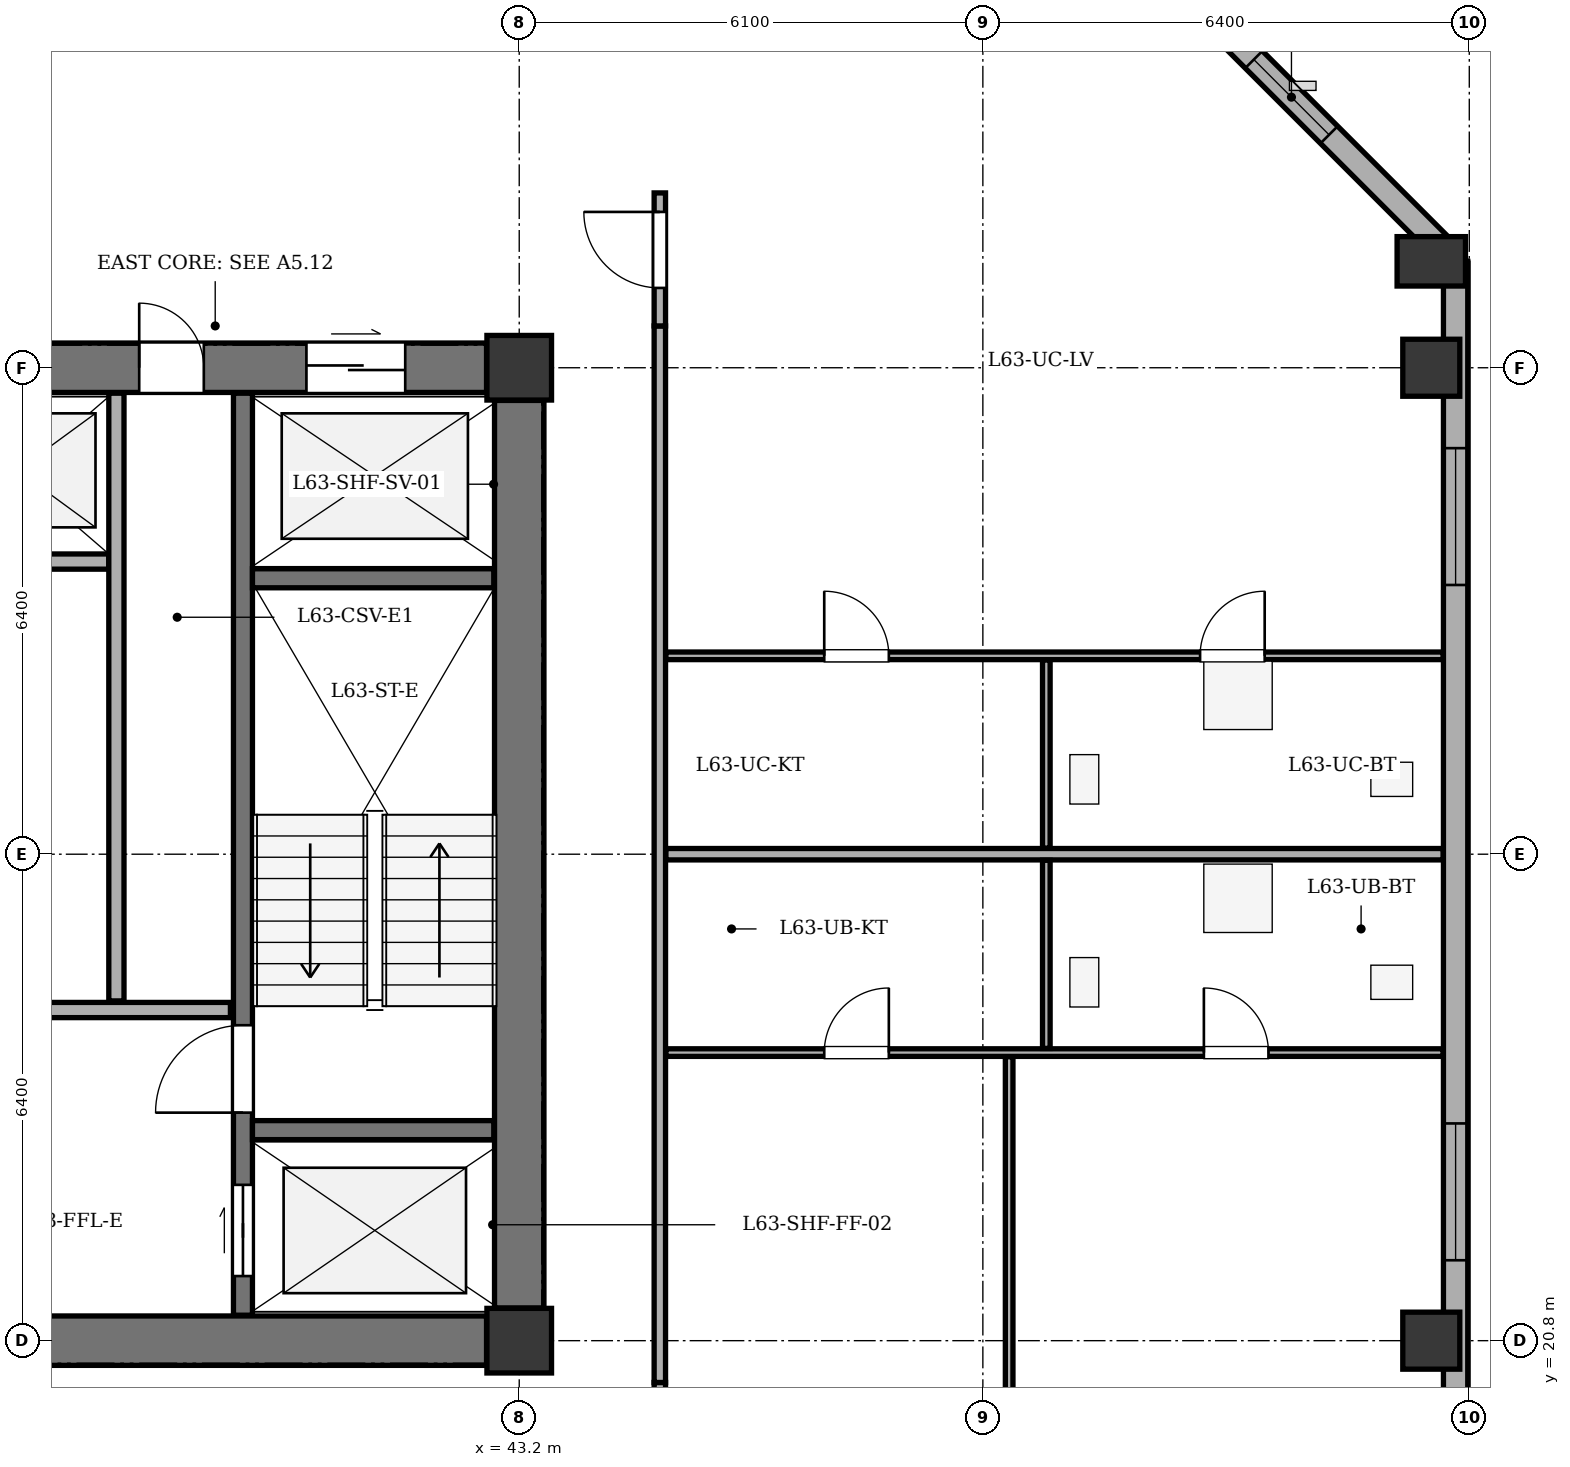
"""IFC4 building model, lengths in metres.
Left out: names, types, materials, properties, quantities, classifications, styles, units other than length and angle.
Written with IfcOpenShell. Run it as: python <this file> out.ifc"""

import sys

from ifc_helpers import new_model, si_unit, direction, frame, frame_2d, origin, origin_2d, place, context, subcontext, project, spatial, rectangle, extrude, element, fill, save


model = new_model("IFC4")
c1 = context("Model", 3, precision=1e-05, world=origin(), true_north=direction((0.0, 1.0)))
c2 = subcontext(c1, "Body", "Model", "MODEL_VIEW")
j1 = project(units=[si_unit("LENGTHUNIT", "METRE"), si_unit("PLANEANGLEUNIT", "RADIAN")], contexts=[c1])
p1 = place(None, origin())
s1 = spatial("IfcSite", under=j1, at=p1, CompositionType="ELEMENT")
p2 = place(p1, origin())
s2 = spatial("IfcBuilding", under=s1, at=p2, CompositionType="ELEMENT")
p3 = place(p2, frame((0.0, 0.0, 241.5)))
s3 = spatial("IfcBuildingStorey", under=s2, at=p3, CompositionType="ELEMENT", Elevation=241.5)
for number, where, z_axis, x_axis in (
    (1, (43.2, 20.8, 0.0), (0.0, 0.0, 1.0), (1.0, 0.0, 0.0)),
    (2, (43.2, 33.6, 0.0), (0.0, 0.0, 1.0), (1.0, 0.0, 0.0)),
):
    element("IfcColumn", number, at=place(p3, frame(where, z_axis=z_axis, x_axis=x_axis)), inside=s3, PredefinedType="COLUMN", context=c2, shape_type="SweptSolid", body=[
        extrude(rectangle(XDim=0.85, YDim=0.85, at=origin_2d()), origin(), (0.0, 0.0, 1.0), 3.4),
    ])
for number, where, z_axis, x_axis in (
    (3, (55.2, 20.8, 0.0), (0.0, 0.0, 1.0), (1.0, 0.0, 0.0)),
    (4, (55.2, 33.6, 0.0), (0.0, 0.0, 1.0), (1.0, 0.0, 0.0)),
):
    element("IfcColumn", number, at=place(p3, frame(where, z_axis=z_axis, x_axis=x_axis)), inside=s3, PredefinedType="COLUMN", context=c2, shape_type="SweptSolid", body=[
        extrude(rectangle(XDim=0.75, YDim=0.75, at=origin_2d()), origin(), (0.0, 0.0, 1.0), 3.4),
    ])
p4 = place(p3, frame((55.2, 35.0, 0.0), z_axis=(0.0, 0.0, 1.0), x_axis=(1.0, 0.0, 0.0)))
e5 = element("IfcColumn", 5, at=p4, inside=s3, PredefinedType="COLUMN", context=c2, shape_type="SweptSolid", body=[
    extrude(rectangle(XDim=0.65, YDim=0.9, at=origin_2d()), origin(), (0.0, 0.0, 1.0), 3.4),
])
p5 = place(p3, frame((51.2, 39.32, 0.0), z_axis=(0.0, 0.0, 1.0), x_axis=(0.707106781187, -0.707106781187, 0.0)))
e6 = element("IfcWall", 6, at=p5, inside=s3, PredefinedType="STANDARD", context=c2, shape_type="SweptSolid", body=[
    extrude(rectangle(XDim=6.11, YDim=0.32, at=frame_2d((3.055, 0.0))), origin(), (0.0, 0.0, 1.0), 2.725),
])
p6 = place(p5, frame((2.355, 0.0, 0.75)))
e7 = element("IfcOpeningElement", 7, at=p6, cuts=e6, PredefinedType="OPENING", context=c2, shape_type="SweptSolid", body=[
    extrude(rectangle(XDim=1.4, YDim=1.65, at=frame_2d((0.7, 0.825))), frame((0.0, 0.17, 0.0), z_axis=(0.0, -1.0, 0.0), x_axis=(1.0, 0.0, 0.0)), (0.0, 0.0, 1.0), 0.34),
])
p7 = place(p3, frame((55.52, 35.0, 0.0), z_axis=(0.0, 0.0, 1.0), x_axis=(0.0, -1.0, 0.0)))
e8 = element("IfcWall", 8, at=p7, inside=s3, PredefinedType="STANDARD", context=c2, shape_type="SweptSolid", body=[
    extrude(rectangle(XDim=27.8, YDim=0.32, at=frame_2d((13.9, 0.0))), origin(), (0.0, 0.0, 1.0), 2.725),
])
p8 = place(p7, frame((2.458, 0.0, 0.75)))
e9 = element("IfcOpeningElement", 9, at=p8, cuts=e8, PredefinedType="OPENING", context=c2, shape_type="SweptSolid", body=[
    extrude(rectangle(XDim=1.8, YDim=1.7, at=frame_2d((0.9, 0.85))), frame((0.0, 0.17, 0.0), z_axis=(0.0, -1.0, 0.0), x_axis=(1.0, 0.0, 0.0)), (0.0, 0.0, 1.0), 0.34),
])
p9 = place(p7, frame((11.342, 0.0, 0.75)))
e10 = element("IfcOpeningElement", 10, at=p9, cuts=e8, PredefinedType="OPENING", context=c2, shape_type="SweptSolid", body=[
    extrude(rectangle(XDim=1.8, YDim=1.7, at=frame_2d((0.9, 0.85))), frame((0.0, 0.17, 0.0), z_axis=(0.0, -1.0, 0.0), x_axis=(1.0, 0.0, 0.0)), (0.0, 0.0, 1.0), 0.34),
])
p10 = place(p7, frame((17.117, 0.0, 0.75)))
e11 = element("IfcOpeningElement", 11, at=p10, cuts=e8, PredefinedType="OPENING", context=c2, shape_type="SweptSolid", body=[
    extrude(rectangle(XDim=1.8, YDim=1.7, at=frame_2d((0.9, 0.85))), frame((0.0, 0.17, 0.0), z_axis=(0.0, -1.0, 0.0), x_axis=(1.0, 0.0, 0.0)), (0.0, 0.0, 1.0), 0.34),
])
p11 = place(p7, frame((22.808, 0.0, 0.75)))
e12 = element("IfcOpeningElement", 12, at=p11, cuts=e8, PredefinedType="OPENING", context=c2, shape_type="SweptSolid", body=[
    extrude(rectangle(XDim=2.2, YDim=1.7, at=frame_2d((1.1, 0.85))), frame((0.0, 0.17, 0.0), z_axis=(0.0, -1.0, 0.0), x_axis=(1.0, 0.0, 0.0)), (0.0, 0.0, 1.0), 0.34),
])
p12 = place(p3, frame((43.2, 21.23, 0.0), z_axis=(0.0, 0.0, 1.0), x_axis=(0.0, 1.0, 0.0)))
e13 = element("IfcWall", 13, at=p12, inside=s3, PredefinedType="SHEAR", context=c2, shape_type="SweptSolid", body=[
    extrude(rectangle(XDim=11.94, YDim=0.65, at=frame_2d((5.97, 0.0))), origin(), (0.0, 0.0, 1.0), 3.1),
])
p13 = place(p3, frame((35.63, 20.8, 0.0), z_axis=(0.0, 0.0, 1.0), x_axis=(1.0, 0.0, 0.0)))
e14 = element("IfcWall", 14, at=p13, inside=s3, PredefinedType="SHEAR", context=c2, shape_type="SweptSolid", body=[
    extrude(rectangle(XDim=7.14, YDim=0.65, at=frame_2d((3.57, 0.0))), origin(), (0.0, 0.0, 1.0), 3.1),
])
p14 = place(p3, frame((35.63, 33.6, 0.0), z_axis=(0.0, 0.0, 1.0), x_axis=(1.0, 0.0, 0.0)))
e15 = element("IfcWall", 15, at=p14, inside=s3, PredefinedType="SHEAR", context=c2, shape_type="SweptSolid", body=[
    extrude(rectangle(XDim=7.14, YDim=0.65, at=frame_2d((3.57, 0.0))), origin(), (0.0, 0.0, 1.0), 3.1),
])
p15 = place(p14, frame((4.77, 0.0, 0.0)))
e16 = element("IfcOpeningElement", 16, at=p15, cuts=e15, PredefinedType="OPENING", context=c2, shape_type="SweptSolid", body=[
    extrude(rectangle(XDim=1.3, YDim=2.15, at=frame_2d((0.65, 1.075))), frame((0.0, 0.335, 0.0), z_axis=(0.0, -1.0, 0.0), x_axis=(1.0, 0.0, 0.0)), (0.0, 0.0, 1.0), 0.67),
])
p16 = place(p14, frame((2.57, 0.0, 0.0)))
e17 = element("IfcOpeningElement", 17, at=p16, cuts=e15, PredefinedType="OPENING", context=c2, shape_type="SweptSolid", body=[
    extrude(rectangle(XDim=0.85, YDim=2.02, at=frame_2d((0.425, 1.01))), frame((0.0, 0.335, 0.0), z_axis=(0.0, -1.0, 0.0), x_axis=(1.0, 0.0, 0.0)), (0.0, 0.0, 1.0), 0.67),
])
p17 = place(p3, frame((39.565, 21.135, 0.0), z_axis=(0.0, 0.0, 1.0), x_axis=(0.0, 1.0, 0.0)))
e18 = element("IfcWall", 18, at=p17, inside=s3, PredefinedType="SHEAR", context=c2, shape_type="SweptSolid", body=[
    extrude(rectangle(XDim=12.13, YDim=0.25, at=frame_2d((6.065, 0.0))), origin(), (0.0, 0.0, 1.0), 3.1),
])
p18 = place(p17, frame((0.515, 0.0, 0.0)))
e19 = element("IfcOpeningElement", 19, at=p18, cuts=e18, PredefinedType="OPENING", context=c2, shape_type="SweptSolid", body=[
    extrude(rectangle(XDim=1.2, YDim=2.15, at=frame_2d((0.6, 1.075))), frame((0.0, 0.135, 0.0), z_axis=(0.0, -1.0, 0.0), x_axis=(1.0, 0.0, 0.0)), (0.0, 0.0, 1.0), 0.27),
])
p19 = place(p17, frame((2.665, 0.0, 0.0)))
e20 = element("IfcOpeningElement", 20, at=p19, cuts=e18, PredefinedType="OPENING", context=c2, shape_type="SweptSolid", body=[
    extrude(rectangle(XDim=1.15, YDim=2.15, at=frame_2d((0.575, 1.075))), frame((0.0, 0.135, 0.0), z_axis=(0.0, -1.0, 0.0), x_axis=(1.0, 0.0, 0.0)), (0.0, 0.0, 1.0), 0.27),
])
for number, where, z_axis, x_axis in (
    (21, (39.69, 23.57, 0.0), (0.0, 0.0, 1.0), (1.0, 0.0, 0.0)),
    (22, (39.69, 30.83, 0.0), (0.0, 0.0, 1.0), (1.0, 0.0, 0.0)),
):
    element("IfcWall", number, at=place(p3, frame(where, z_axis=z_axis, x_axis=x_axis)), inside=s3, PredefinedType="SHEAR", context=c2, shape_type="SweptSolid", body=[
        extrude(rectangle(XDim=3.175, YDim=0.25, at=frame_2d((1.587, 0.0))), origin(), (0.0, 0.0, 1.0), 3.1),
    ])
p20 = place(p3, frame((35.55, 25.15, 0.0), z_axis=(0.0, 0.0, 1.0), x_axis=(1.0, 0.0, 0.0)))
e23 = element("IfcWall", 23, at=p20, inside=s3, PredefinedType="SOLIDWALL", context=c2, shape_type="SweptSolid", body=[
    extrude(rectangle(XDim=3.85, YDim=0.2, at=frame_2d((1.925, 0.0))), origin(), (0.0, 0.0, 1.0), 3.1),
])
p21 = place(p3, frame((35.55, 31.05, 0.0), z_axis=(0.0, 0.0, 1.0), x_axis=(1.0, 0.0, 0.0)))
e24 = element("IfcWall", 24, at=p21, inside=s3, PredefinedType="SOLIDWALL", context=c2, shape_type="SweptSolid", body=[
    extrude(rectangle(XDim=2.25, YDim=0.2, at=frame_2d((1.125, 0.0))), origin(), (0.0, 0.0, 1.0), 3.1),
])
p22 = place(p3, frame((37.9, 25.27, 0.0), z_axis=(0.0, 0.0, 1.0), x_axis=(0.0, 1.0, 0.0)))
e25 = element("IfcWall", 25, at=p22, inside=s3, PredefinedType="SOLIDWALL", context=c2, shape_type="SweptSolid", body=[
    extrude(rectangle(XDim=7.995, YDim=0.2, at=frame_2d((3.998, 0.0))), origin(), (0.0, 0.0, 1.0), 3.1),
])
p23 = place(p3, frame((45.05, 18.46, 0.0), z_axis=(0.0, 0.0, 1.0), x_axis=(0.0, 1.0, 0.0)))
e26 = element("IfcWall", 26, at=p23, inside=s3, PredefinedType="PARTITIONING", context=c2, shape_type="SweptSolid", body=[
    extrude(rectangle(XDim=1.79, YDim=0.15, at=frame_2d((0.895, 0.0))), origin(), (0.0, 0.0, 1.0), 2.725),
])
p24 = place(p23, frame((0.375, 0.0, 0.0)))
e27 = element("IfcOpeningElement", 27, at=p24, cuts=e26, PredefinedType="OPENING", context=c2, shape_type="SweptSolid", body=[
    extrude(rectangle(XDim=1.0, YDim=2.1, at=frame_2d((0.5, 1.05))), frame((0.0, 0.085, 0.0), z_axis=(0.0, -1.0, 0.0), x_axis=(1.0, 0.0, 0.0)), (0.0, 0.0, 1.0), 0.17),
])
p25 = place(p3, frame((45.05, 20.25, 0.0), z_axis=(0.0, 0.0, 1.0), x_axis=(0.0, 1.0, 0.0)))
e28 = element("IfcWall", 28, at=p25, inside=s3, PredefinedType="PARTITIONING", context=c2, shape_type="SweptSolid", body=[
    extrude(rectangle(XDim=13.9, YDim=0.15, at=frame_2d((6.95, 0.0))), origin(), (0.0, 0.0, 1.0), 2.725),
])
p26 = place(p3, frame((45.05, 34.15, 0.0), z_axis=(0.0, 0.0, 1.0), x_axis=(0.0, 1.0, 0.0)))
e29 = element("IfcWall", 29, at=p26, inside=s3, PredefinedType="PARTITIONING", context=c2, shape_type="SweptSolid", body=[
    extrude(rectangle(XDim=1.75, YDim=0.15, at=frame_2d((0.875, 0.0))), origin(), (0.0, 0.0, 1.0), 2.725),
])
p27 = place(p26, frame((0.5, 0.0, 0.0)))
e30 = element("IfcOpeningElement", 30, at=p27, cuts=e29, PredefinedType="OPENING", context=c2, shape_type="SweptSolid", body=[
    extrude(rectangle(XDim=1.0, YDim=2.1, at=frame_2d((0.5, 1.05))), frame((0.0, 0.085, 0.0), z_axis=(0.0, -1.0, 0.0), x_axis=(1.0, 0.0, 0.0)), (0.0, 0.0, 1.0), 0.17),
])
p28 = place(p3, frame((45.13, 27.2, 0.0), z_axis=(0.0, 0.0, 1.0), x_axis=(1.0, 0.0, 0.0)))
e31 = element("IfcWall", 31, at=p28, inside=s3, PredefinedType="PARTITIONING", context=c2, shape_type="SweptSolid", body=[
    extrude(rectangle(XDim=10.225, YDim=0.15, at=frame_2d((5.113, 0.0))), origin(), (0.0, 0.0, 1.0), 2.725),
])
p29 = place(p3, frame((45.13, 24.59, 0.0), z_axis=(0.0, 0.0, 1.0), x_axis=(1.0, 0.0, 0.0)))
e32 = element("IfcWall", 32, at=p29, inside=s3, PredefinedType="PARTITIONING", context=c2, shape_type="SweptSolid", body=[
    extrude(rectangle(XDim=10.225, YDim=0.1, at=frame_2d((5.113, 0.0))), origin(), (0.0, 0.0, 1.0), 3.1),
])
p30 = place(p29, frame((2.083, 0.0, 0.0)))
e33 = element("IfcOpeningElement", 33, at=p30, cuts=e32, PredefinedType="OPENING", context=c2, shape_type="SweptSolid", body=[
    extrude(rectangle(XDim=0.85, YDim=2.05, at=frame_2d((0.425, 1.025))), frame((0.0, 0.06, 0.0), z_axis=(0.0, -1.0, 0.0), x_axis=(1.0, 0.0, 0.0)), (0.0, 0.0, 1.0), 0.12),
])
p31 = place(p29, frame((7.078, 0.0, 0.0)))
e34 = element("IfcOpeningElement", 34, at=p31, cuts=e32, PredefinedType="OPENING", context=c2, shape_type="SweptSolid", body=[
    extrude(rectangle(XDim=0.85, YDim=2.05, at=frame_2d((0.425, 1.025))), frame((0.0, 0.06, 0.0), z_axis=(0.0, -1.0, 0.0), x_axis=(1.0, 0.0, 0.0)), (0.0, 0.0, 1.0), 0.12),
])
p32 = place(p3, frame((49.646, 7.08, 0.0), z_axis=(0.0, 0.0, 1.0), x_axis=(0.0, 1.0, 0.0)))
e35 = element("IfcWall", 35, at=p32, inside=s3, PredefinedType="PARTITIONING", context=c2, shape_type="SweptSolid", body=[
    extrude(rectangle(XDim=17.455, YDim=0.1, at=frame_2d((8.728, 0.0))), origin(), (0.0, 0.0, 1.0), 3.1),
])
p33 = place(p32, frame((0.7, 0.0, 0.0)))
e36 = element("IfcOpeningElement", 36, at=p33, cuts=e35, PredefinedType="OPENING", context=c2, shape_type="SweptSolid", body=[
    extrude(rectangle(XDim=0.9, YDim=2.05, at=frame_2d((0.45, 1.025))), frame((0.0, 0.06, 0.0), z_axis=(0.0, -1.0, 0.0), x_axis=(1.0, 0.0, 0.0)), (0.0, 0.0, 1.0), 0.12),
])
p34 = place(p3, frame((50.135, 24.645, 0.0), z_axis=(0.0, 0.0, 1.0), x_axis=(0.0, 1.0, 0.0)))
e37 = element("IfcWall", 37, at=p34, inside=s3, PredefinedType="PARTITIONING", context=c2, shape_type="SweptSolid", body=[
    extrude(rectangle(XDim=2.475, YDim=0.1, at=frame_2d((1.238, 0.0))), origin(), (0.0, 0.0, 1.0), 3.1),
])
p35 = place(p3, frame((45.13, 29.81, 0.0), z_axis=(0.0, 0.0, 1.0), x_axis=(1.0, 0.0, 0.0)))
e38 = element("IfcWall", 38, at=p35, inside=s3, PredefinedType="PARTITIONING", context=c2, shape_type="SweptSolid", body=[
    extrude(rectangle(XDim=10.225, YDim=0.1, at=frame_2d((5.113, 0.0))), origin(), (0.0, 0.0, 1.0), 3.1),
])
p36 = place(p35, frame((2.083, 0.0, 0.0)))
e39 = element("IfcOpeningElement", 39, at=p36, cuts=e38, PredefinedType="OPENING", context=c2, shape_type="SweptSolid", body=[
    extrude(rectangle(XDim=0.85, YDim=2.05, at=frame_2d((0.425, 1.025))), frame((0.0, 0.06, 0.0), z_axis=(0.0, -1.0, 0.0), x_axis=(1.0, 0.0, 0.0)), (0.0, 0.0, 1.0), 0.12),
])
p37 = place(p35, frame((7.028, 0.0, 0.0)))
e40 = element("IfcOpeningElement", 40, at=p37, cuts=e38, PredefinedType="OPENING", context=c2, shape_type="SweptSolid", body=[
    extrude(rectangle(XDim=0.85, YDim=2.05, at=frame_2d((0.425, 1.025))), frame((0.0, 0.06, 0.0), z_axis=(0.0, -1.0, 0.0), x_axis=(1.0, 0.0, 0.0)), (0.0, 0.0, 1.0), 0.12),
])
p38 = place(p3, frame((50.135, 27.28, 0.0), z_axis=(0.0, 0.0, 1.0), x_axis=(0.0, 1.0, 0.0)))
e41 = element("IfcWall", 41, at=p38, inside=s3, PredefinedType="PARTITIONING", context=c2, shape_type="SweptSolid", body=[
    extrude(rectangle(XDim=2.475, YDim=0.1, at=frame_2d((1.237, 0.0))), origin(), (0.0, 0.0, 1.0), 3.1),
])
p39 = place(p8, origin())
e42 = element("IfcWindow", 42, at=p39, inside=s3, PartitioningType="SINGLE_PANEL", PredefinedType="WINDOW", context=c2, shape_type="SweptSolid", body=[
    extrude(rectangle(XDim=1.8, YDim=1.7, at=frame_2d((0.9, 0.85))), frame((0.0, -0.01, 0.0), z_axis=(0.0, -1.0, 0.0), x_axis=(1.0, 0.0, 0.0)), (0.0, 0.0, 1.0), 0.06),
])
fill(e9, e42)
p40 = place(p9, origin())
e43 = element("IfcWindow", 43, at=p40, inside=s3, PartitioningType="SINGLE_PANEL", PredefinedType="WINDOW", context=c2, shape_type="SweptSolid", body=[
    extrude(rectangle(XDim=1.8, YDim=1.7, at=frame_2d((0.9, 0.85))), frame((0.0, -0.01, 0.0), z_axis=(0.0, -1.0, 0.0), x_axis=(1.0, 0.0, 0.0)), (0.0, 0.0, 1.0), 0.06),
])
fill(e10, e43)
p41 = place(p6, origin())
e44 = element("IfcWindow", 44, at=p41, inside=s3, PartitioningType="SINGLE_PANEL", PredefinedType="WINDOW", context=c2, shape_type="SweptSolid", body=[
    extrude(rectangle(XDim=1.4, YDim=1.65, at=frame_2d((0.7, 0.825))), frame((0.0, -0.01, 0.0), z_axis=(0.0, -1.0, 0.0), x_axis=(1.0, 0.0, 0.0)), (0.0, 0.0, 1.0), 0.06),
])
fill(e7, e44)
p42 = place(p15, origin())
e45 = element("IfcDoor", 45, at=p42, inside=s3, OperationType="DOUBLE_DOOR_SLIDING", PredefinedType="DOOR", context=c2, shape_type="SweptSolid", body=[
    extrude(rectangle(XDim=1.3, YDim=2.15, at=frame_2d((0.65, 1.075))), frame((0.0, 0.025, 0.0), z_axis=(0.0, -1.0, 0.0), x_axis=(1.0, 0.0, 0.0)), (0.0, 0.0, 1.0), 0.05),
])
fill(e16, e45)
p43 = place(p16, origin())
e46 = element("IfcDoor", 46, at=p43, inside=s3, OperationType="SINGLE_SWING_LEFT", PredefinedType="DOOR", context=c2, shape_type="SweptSolid", body=[
    extrude(rectangle(XDim=0.85, YDim=2.02, at=frame_2d((0.425, 1.01))), frame((0.0, 0.025, 0.0), z_axis=(0.0, -1.0, 0.0), x_axis=(1.0, 0.0, 0.0)), (0.0, 0.0, 1.0), 0.05),
])
fill(e17, e46)
p44 = place(p18, origin())
e47 = element("IfcDoor", 47, at=p44, inside=s3, OperationType="DOUBLE_DOOR_SLIDING", PredefinedType="DOOR", context=c2, shape_type="SweptSolid", body=[
    extrude(rectangle(XDim=1.2, YDim=2.15, at=frame_2d((0.6, 1.075))), frame((0.0, 0.025, 0.0), z_axis=(0.0, -1.0, 0.0), x_axis=(1.0, 0.0, 0.0)), (0.0, 0.0, 1.0), 0.05),
])
fill(e19, e47)
p45 = place(p19, origin())
e48 = element("IfcDoor", 48, at=p45, inside=s3, OperationType="SINGLE_SWING_LEFT", PredefinedType="DOOR", context=c2, shape_type="SweptSolid", body=[
    extrude(rectangle(XDim=1.15, YDim=2.15, at=frame_2d((0.575, 1.075))), frame((0.0, 0.025, 0.0), z_axis=(0.0, -1.0, 0.0), x_axis=(1.0, 0.0, 0.0)), (0.0, 0.0, 1.0), 0.05),
])
fill(e20, e48)
p46 = place(p30, origin())
e49 = element("IfcDoor", 49, at=p46, inside=s3, OperationType="SINGLE_SWING_RIGHT", PredefinedType="DOOR", context=c2, shape_type="SweptSolid", body=[
    extrude(rectangle(XDim=0.85, YDim=2.05, at=frame_2d((0.425, 1.025))), frame((0.0, 0.025, 0.0), z_axis=(0.0, -1.0, 0.0), x_axis=(1.0, 0.0, 0.0)), (0.0, 0.0, 1.0), 0.05),
])
fill(e33, e49)
p47 = place(p31, origin())
e50 = element("IfcDoor", 50, at=p47, inside=s3, OperationType="SINGLE_SWING_LEFT", PredefinedType="DOOR", context=c2, shape_type="SweptSolid", body=[
    extrude(rectangle(XDim=0.85, YDim=2.05, at=frame_2d((0.425, 1.025))), frame((0.0, 0.025, 0.0), z_axis=(0.0, -1.0, 0.0), x_axis=(1.0, 0.0, 0.0)), (0.0, 0.0, 1.0), 0.05),
])
fill(e34, e50)
p48 = place(p27, origin())
e51 = element("IfcDoor", 51, at=p48, inside=s3, OperationType="SINGLE_SWING_RIGHT", PredefinedType="DOOR", context=c2, shape_type="SweptSolid", body=[
    extrude(rectangle(XDim=1.0, YDim=2.1, at=frame_2d((0.5, 1.05))), frame((0.0, 0.025, 0.0), z_axis=(0.0, -1.0, 0.0), x_axis=(1.0, 0.0, 0.0)), (0.0, 0.0, 1.0), 0.05),
])
fill(e30, e51)
p49 = place(p36, origin())
e52 = element("IfcDoor", 52, at=p49, inside=s3, OperationType="SINGLE_SWING_LEFT", PredefinedType="DOOR", context=c2, shape_type="SweptSolid", body=[
    extrude(rectangle(XDim=0.85, YDim=2.05, at=frame_2d((0.425, 1.025))), frame((0.0, 0.025, 0.0), z_axis=(0.0, -1.0, 0.0), x_axis=(1.0, 0.0, 0.0)), (0.0, 0.0, 1.0), 0.05),
])
fill(e39, e52)
p50 = place(p37, origin())
e53 = element("IfcDoor", 53, at=p50, inside=s3, OperationType="SINGLE_SWING_RIGHT", PredefinedType="DOOR", context=c2, shape_type="SweptSolid", body=[
    extrude(rectangle(XDim=0.85, YDim=2.05, at=frame_2d((0.425, 1.025))), frame((0.0, 0.025, 0.0), z_axis=(0.0, -1.0, 0.0), x_axis=(1.0, 0.0, 0.0)), (0.0, 0.0, 1.0), 0.05),
])
fill(e40, e53)
save(model, sys.argv[1])
